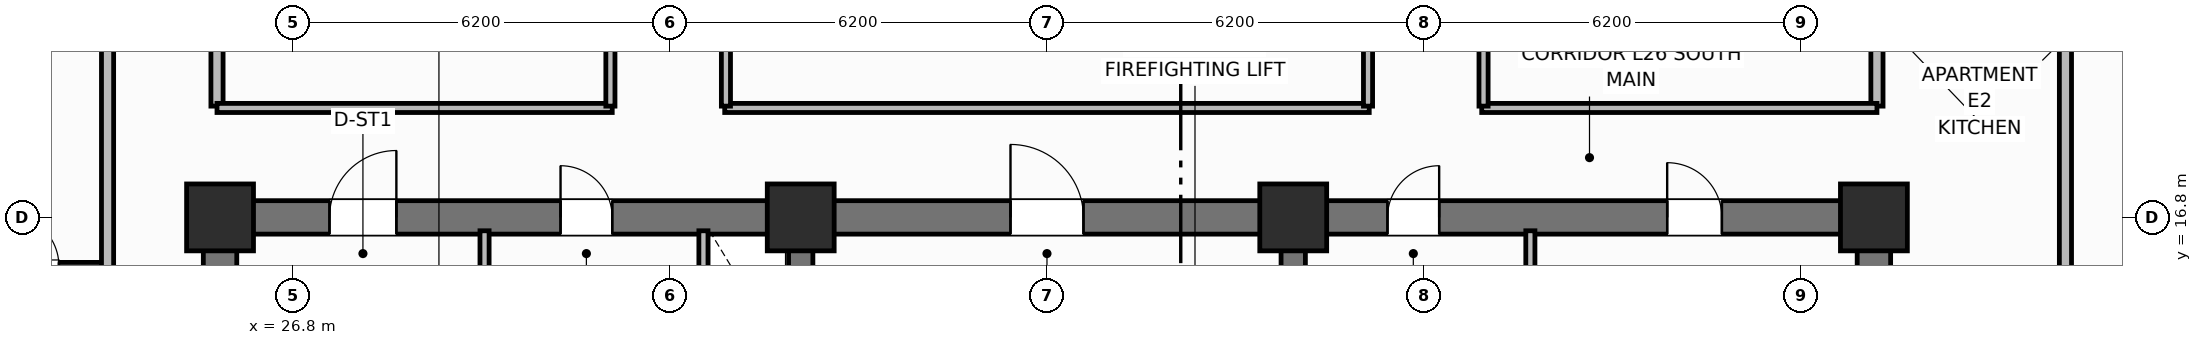
"""IFC4 building model, lengths in metres.
Left out: names, types, materials, properties, quantities, classifications, styles, units other than length and angle.
Written with IfcOpenShell. Run it as: python <this file> out.ifc"""

import sys

from ifc_helpers import new_model, si_unit, direction, frame, frame_2d, origin, origin_2d, place, context, subcontext, project, spatial, rectangle, extrude, element, fill, save


model = new_model("IFC4")
c1 = context("Model", 3, precision=1e-05, world=origin(), true_north=direction((0.0, 1.0)))
c2 = subcontext(c1, "Body", "Model", "MODEL_VIEW")
j1 = project(units=[si_unit("LENGTHUNIT", "METRE"), si_unit("PLANEANGLEUNIT", "RADIAN")], contexts=[c1])
p1 = place(None, origin())
s1 = spatial("IfcSite", under=j1, at=p1, CompositionType="ELEMENT")
p2 = place(p1, origin())
s2 = spatial("IfcBuilding", under=s1, at=p2, CompositionType="ELEMENT")
p3 = place(p2, frame((0.0, 0.0, 106.8)))
s3 = spatial("IfcBuildingStorey", under=s2, at=p3, CompositionType="ELEMENT", Elevation=106.8)
for number, where, z_axis, x_axis in (
    (1, (25.6, 10.875, 0.0), (0.0, 0.0, 1.0), (0.0, 1.0, 0.0)),
    (2, (52.8, 10.875, 0.0), (0.0, 0.0, 1.0), (0.0, 1.0, 0.0)),
):
    element("IfcWall", number, at=place(p3, frame(where, z_axis=z_axis, x_axis=x_axis)), inside=s3, PredefinedType="SHEAR", context=c2, shape_type="SweptSolid", body=[
        extrude(rectangle(XDim=5.65, YDim=0.55, at=frame_2d((2.825, 0.0))), origin(), (0.0, 0.0, 1.0), 3.7),
    ])
p4 = place(p3, frame((25.6, 16.8, 0.0), z_axis=(0.0, 0.0, 1.0), x_axis=(1.0, 0.0, 0.0)))
e3 = element("IfcWall", 3, at=p4, inside=s3, PredefinedType="SHEAR", context=c2, shape_type="SweptSolid", body=[
    extrude(rectangle(XDim=27.2, YDim=0.55, at=frame_2d((13.6, 0.0))), origin(), (0.0, 0.0, 1.0), 3.7),
])
p5 = place(p4, frame((1.8, 0.0, 0.0)))
e4 = element("IfcOpeningElement", 4, at=p5, cuts=e3, PredefinedType="OPENING", context=c2, shape_type="SweptSolid", body=[
    extrude(rectangle(XDim=1.1, YDim=2.15, at=frame_2d((0.55, 1.075))), frame((0.0, 0.285, 0.0), z_axis=(0.0, -1.0, 0.0), x_axis=(1.0, 0.0, 0.0)), (0.0, 0.0, 1.0), 0.57),
])
p6 = place(p4, frame((5.6, 0.0, 0.0)))
e5 = element("IfcOpeningElement", 5, at=p6, cuts=e3, PredefinedType="OPENING", context=c2, shape_type="SweptSolid", body=[
    extrude(rectangle(XDim=0.85, YDim=2.1, at=frame_2d((0.425, 1.05))), frame((0.0, 0.285, 0.0), z_axis=(0.0, -1.0, 0.0), x_axis=(1.0, 0.0, 0.0)), (0.0, 0.0, 1.0), 0.57),
])
p7 = place(p4, frame((13.0, 0.0, 0.0)))
e6 = element("IfcOpeningElement", 6, at=p7, cuts=e3, PredefinedType="OPENING", context=c2, shape_type="SweptSolid", body=[
    extrude(rectangle(XDim=1.2, YDim=2.15, at=frame_2d((0.6, 1.075))), frame((0.0, 0.285, 0.0), z_axis=(0.0, -1.0, 0.0), x_axis=(1.0, 0.0, 0.0)), (0.0, 0.0, 1.0), 0.57),
])
p8 = place(p4, frame((19.2, 0.0, 0.0)))
e7 = element("IfcOpeningElement", 7, at=p8, cuts=e3, PredefinedType="OPENING", context=c2, shape_type="SweptSolid", body=[
    extrude(rectangle(XDim=0.85, YDim=2.1, at=frame_2d((0.425, 1.05))), frame((0.0, 0.285, 0.0), z_axis=(0.0, -1.0, 0.0), x_axis=(1.0, 0.0, 0.0)), (0.0, 0.0, 1.0), 0.57),
])
p9 = place(p4, frame((23.8, 0.0, 0.0)))
e8 = element("IfcOpeningElement", 8, at=p9, cuts=e3, PredefinedType="OPENING", context=c2, shape_type="SweptSolid", body=[
    extrude(rectangle(XDim=0.9, YDim=2.1, at=frame_2d((0.45, 1.05))), frame((0.0, 0.285, 0.0), z_axis=(0.0, -1.0, 0.0), x_axis=(1.0, 0.0, 0.0)), (0.0, 0.0, 1.0), 0.57),
])
for number, where, z_axis, x_axis in (
    (9, (35.15, 10.875, 0.0), (0.0, 0.0, 1.0), (0.0, 1.0, 0.0)),
    (10, (43.25, 10.875, 0.0), (0.0, 0.0, 1.0), (0.0, 1.0, 0.0)),
):
    element("IfcWall", number, at=place(p3, frame(where, z_axis=z_axis, x_axis=x_axis)), inside=s3, PredefinedType="SHEAR", context=c2, shape_type="SweptSolid", body=[
        extrude(rectangle(XDim=5.65, YDim=0.4, at=frame_2d((2.825, 0.0))), origin(), (0.0, 0.0, 1.0), 3.7),
    ])
for number, where, z_axis, x_axis in (
    (11, (25.6, 16.8, 0.0), (0.0, 0.0, 1.0), (1.0, 0.0, 0.0)),
    (12, (35.15, 16.8, 0.0), (0.0, 0.0, 1.0), (1.0, 0.0, 0.0)),
    (13, (43.25, 16.8, 0.0), (0.0, 0.0, 1.0), (1.0, 0.0, 0.0)),
    (14, (52.8, 16.8, 0.0), (0.0, 0.0, 1.0), (1.0, 0.0, 0.0)),
):
    element("IfcColumn", number, at=place(p3, frame(where, z_axis=z_axis, x_axis=x_axis)), inside=s3, PredefinedType="COLUMN", context=c2, shape_type="SweptSolid", body=[
        extrude(rectangle(XDim=1.1, YDim=1.1, at=origin_2d()), origin(), (0.0, 0.0, 1.0), 3.7),
    ])
p10 = place(p3, frame((29.95, 14.5, 0.0), z_axis=(0.0, 0.0, 1.0), x_axis=(0.0, 1.0, 0.0)))
e15 = element("IfcWall", 15, at=p10, inside=s3, PredefinedType="PARTITIONING", context=c2, shape_type="SweptSolid", body=[
    extrude(rectangle(XDim=2.08, YDim=0.15, at=frame_2d((1.04, 0.0))), origin(), (0.0, 0.0, 1.0), 2.53),
])
p11 = place(p3, frame((33.55, 14.5, 0.0), z_axis=(0.0, 0.0, 1.0), x_axis=(0.0, 1.0, 0.0)))
e16 = element("IfcWall", 16, at=p11, inside=s3, PredefinedType="PARTITIONING", context=c2, shape_type="SweptSolid", body=[
    extrude(rectangle(XDim=2.08, YDim=0.15, at=frame_2d((1.04, 0.0))), origin(), (0.0, 0.0, 1.0), 2.53),
])
p12 = place(p11, frame((0.55, 0.0, 0.0)))
e17 = element("IfcOpeningElement", 17, at=p12, cuts=e16, PredefinedType="OPENING", context=c2, shape_type="SweptSolid", body=[
    extrude(rectangle(XDim=0.85, YDim=2.05, at=frame_2d((0.425, 1.025))), frame((0.0, 0.085, 0.0), z_axis=(0.0, -1.0, 0.0), x_axis=(1.0, 0.0, 0.0)), (0.0, 0.0, 1.0), 0.17),
])
p13 = place(p3, frame((47.15, 10.95, 0.0), z_axis=(0.0, 0.0, 1.0), x_axis=(0.0, 1.0, 0.0)))
e18 = element("IfcWall", 18, at=p13, inside=s3, PredefinedType="PARTITIONING", context=c2, shape_type="SweptSolid", body=[
    extrude(rectangle(XDim=5.63, YDim=0.15, at=frame_2d((2.815, 0.0))), origin(), (0.0, 0.0, 1.0), 2.53),
])
for number, where, z_axis, x_axis in (
    (19, (25.55, 18.63, 0.0), (0.0, 0.0, 1.0), (0.0, 1.0, 0.0)),
    (20, (52.85, 18.63, 0.0), (0.0, 0.0, 1.0), (0.0, 1.0, 0.0)),
):
    element("IfcWall", number, at=place(p3, frame(where, z_axis=z_axis, x_axis=x_axis)), inside=s3, PredefinedType="PARTITIONING", context=c2, shape_type="SweptSolid", body=[
        extrude(rectangle(XDim=19.14, YDim=0.2, at=frame_2d((9.57, 0.0))), origin(), (0.0, 0.0, 1.0), 2.53),
    ])
p14 = place(p3, frame((25.55, 18.6, 0.0), z_axis=(0.0, 0.0, 1.0), x_axis=(1.0, 0.0, 0.0)))
e21 = element("IfcWall", 21, at=p14, inside=s3, PredefinedType="PARTITIONING", context=c2, shape_type="SweptSolid", body=[
    extrude(rectangle(XDim=6.5, YDim=0.15, at=frame_2d((3.25, 0.0))), origin(), (0.0, 0.0, 1.0), 2.53),
])
p15 = place(p3, frame((33.9, 18.6, 0.0), z_axis=(0.0, 0.0, 1.0), x_axis=(1.0, 0.0, 0.0)))
e22 = element("IfcWall", 22, at=p15, inside=s3, PredefinedType="PARTITIONING", context=c2, shape_type="SweptSolid", body=[
    extrude(rectangle(XDim=10.6, YDim=0.15, at=frame_2d((5.3, 0.0))), origin(), (0.0, 0.0, 1.0), 2.53),
])
p16 = place(p3, frame((46.35, 18.6, 0.0), z_axis=(0.0, 0.0, 1.0), x_axis=(1.0, 0.0, 0.0)))
e23 = element("IfcWall", 23, at=p16, inside=s3, PredefinedType="PARTITIONING", context=c2, shape_type="SweptSolid", body=[
    extrude(rectangle(XDim=6.5, YDim=0.15, at=frame_2d((3.25, 0.0))), origin(), (0.0, 0.0, 1.0), 2.53),
])
p17 = place(p3, frame((32.02, 18.63, 0.0), z_axis=(0.0, 0.0, 1.0), x_axis=(0.0, 1.0, 0.0)))
e24 = element("IfcWall", 24, at=p17, inside=s3, PredefinedType="PARTITIONING", context=c2, shape_type="SweptSolid", body=[
    extrude(rectangle(XDim=19.14, YDim=0.15, at=frame_2d((9.57, 0.0))), origin(), (0.0, 0.0, 1.0), 2.53),
])
p18 = place(p17, frame((5.5, 0.0, 0.0)))
e25 = element("IfcOpeningElement", 25, at=p18, cuts=e24, PredefinedType="OPENING", context=c2, shape_type="SweptSolid", body=[
    extrude(rectangle(XDim=1.0, YDim=2.15, at=frame_2d((0.5, 1.075))), frame((0.0, 0.085, 0.0), z_axis=(0.0, -1.0, 0.0), x_axis=(1.0, 0.0, 0.0)), (0.0, 0.0, 1.0), 0.17),
])
p19 = place(p3, frame((33.92, 18.63, 0.0), z_axis=(0.0, 0.0, 1.0), x_axis=(0.0, 1.0, 0.0)))
e26 = element("IfcWall", 26, at=p19, inside=s3, PredefinedType="PARTITIONING", context=c2, shape_type="SweptSolid", body=[
    extrude(rectangle(XDim=19.14, YDim=0.15, at=frame_2d((9.57, 0.0))), origin(), (0.0, 0.0, 1.0), 2.53),
])
p20 = place(p19, frame((2.4, 0.0, 0.0)))
e27 = element("IfcOpeningElement", 27, at=p20, cuts=e26, PredefinedType="OPENING", context=c2, shape_type="SweptSolid", body=[
    extrude(rectangle(XDim=1.0, YDim=2.15, at=frame_2d((0.5, 1.075))), frame((0.0, 0.085, 0.0), z_axis=(0.0, -1.0, 0.0), x_axis=(1.0, 0.0, 0.0)), (0.0, 0.0, 1.0), 0.17),
])
p21 = place(p3, frame((44.48, 18.63, 0.0), z_axis=(0.0, 0.0, 1.0), x_axis=(0.0, 1.0, 0.0)))
e28 = element("IfcWall", 28, at=p21, inside=s3, PredefinedType="PARTITIONING", context=c2, shape_type="SweptSolid", body=[
    extrude(rectangle(XDim=19.14, YDim=0.15, at=frame_2d((9.57, 0.0))), origin(), (0.0, 0.0, 1.0), 2.53),
])
p22 = place(p21, frame((10.804, 0.0, 0.0)))
e29 = element("IfcOpeningElement", 29, at=p22, cuts=e28, PredefinedType="OPENING", context=c2, shape_type="SweptSolid", body=[
    extrude(rectangle(XDim=1.0, YDim=2.15, at=frame_2d((0.5, 1.075))), frame((0.0, 0.085, 0.0), z_axis=(0.0, -1.0, 0.0), x_axis=(1.0, 0.0, 0.0)), (0.0, 0.0, 1.0), 0.17),
])
p23 = place(p3, frame((46.38, 18.63, 0.0), z_axis=(0.0, 0.0, 1.0), x_axis=(0.0, 1.0, 0.0)))
e30 = element("IfcWall", 30, at=p23, inside=s3, PredefinedType="PARTITIONING", context=c2, shape_type="SweptSolid", body=[
    extrude(rectangle(XDim=19.14, YDim=0.15, at=frame_2d((9.57, 0.0))), origin(), (0.0, 0.0, 1.0), 2.53),
])
p24 = place(p23, frame((5.5, 0.0, 0.0)))
e31 = element("IfcOpeningElement", 31, at=p24, cuts=e30, PredefinedType="OPENING", context=c2, shape_type="SweptSolid", body=[
    extrude(rectangle(XDim=1.0, YDim=2.15, at=frame_2d((0.5, 1.075))), frame((0.0, 0.085, 0.0), z_axis=(0.0, -1.0, 0.0), x_axis=(1.0, 0.0, 0.0)), (0.0, 0.0, 1.0), 0.17),
])
p25 = place(p3, frame((21.5, 16.0, 0.0), z_axis=(0.0, 0.0, 1.0), x_axis=(1.0, 0.0, 0.0)))
e32 = element("IfcWall", 32, at=p25, inside=s3, PredefinedType="PARTITIONING", context=c2, shape_type="SweptSolid", body=[
    extrude(rectangle(XDim=2.25, YDim=0.12, at=frame_2d((1.125, 0.0))), origin(), (0.0, 0.0, 1.0), 2.53),
])
p26 = place(p25, frame((0.6, 0.0, 0.0)))
e33 = element("IfcOpeningElement", 33, at=p26, cuts=e32, PredefinedType="OPENING", context=c2, shape_type="SweptSolid", body=[
    extrude(rectangle(XDim=0.85, YDim=2.1, at=frame_2d((0.425, 1.05))), frame((0.0, 0.07, 0.0), z_axis=(0.0, -1.0, 0.0), x_axis=(1.0, 0.0, 0.0)), (0.0, 0.0, 1.0), 0.14),
])
p27 = place(p3, frame((23.75, 10.6, 0.0), z_axis=(0.0, 0.0, 1.0), x_axis=(0.0, 1.0, 0.0)))
e34 = element("IfcWall", 34, at=p27, inside=s3, PredefinedType="PARTITIONING", context=c2, shape_type="SweptSolid", body=[
    extrude(rectangle(XDim=35.2, YDim=0.2, at=frame_2d((17.6, 0.0))), origin(), (0.0, 0.0, 1.0), 2.53),
])
p28 = place(p27, frame((2.65, 0.0, 0.0)))
e35 = element("IfcOpeningElement", 35, at=p28, cuts=e34, PredefinedType="OPENING", context=c2, shape_type="SweptSolid", body=[
    extrude(rectangle(XDim=1.0, YDim=2.15, at=frame_2d((0.5, 1.075))), frame((0.0, 0.11, 0.0), z_axis=(0.0, -1.0, 0.0), x_axis=(1.0, 0.0, 0.0)), (0.0, 0.0, 1.0), 0.22),
])
p29 = place(p27, frame((12.87, 0.0, 0.0)))
e36 = element("IfcOpeningElement", 36, at=p29, cuts=e34, PredefinedType="OPENING", context=c2, shape_type="SweptSolid", body=[
    extrude(rectangle(XDim=1.0, YDim=2.15, at=frame_2d((0.5, 1.075))), frame((0.0, 0.11, 0.0), z_axis=(0.0, -1.0, 0.0), x_axis=(1.0, 0.0, 0.0)), (0.0, 0.0, 1.0), 0.22),
])
p30 = place(p27, frame((24.486, 0.0, 0.0)))
e37 = element("IfcOpeningElement", 37, at=p30, cuts=e34, PredefinedType="OPENING", context=c2, shape_type="SweptSolid", body=[
    extrude(rectangle(XDim=1.0, YDim=2.15, at=frame_2d((0.5, 1.075))), frame((0.0, 0.11, 0.0), z_axis=(0.0, -1.0, 0.0), x_axis=(1.0, 0.0, 0.0)), (0.0, 0.0, 1.0), 0.22),
])
p31 = place(p3, frame((55.95, 10.6, 0.0), z_axis=(0.0, 0.0, 1.0), x_axis=(0.0, 1.0, 0.0)))
e38 = element("IfcWall", 38, at=p31, inside=s3, PredefinedType="PARTITIONING", context=c2, shape_type="SweptSolid", body=[
    extrude(rectangle(XDim=35.2, YDim=0.2, at=frame_2d((17.6, 0.0))), origin(), (0.0, 0.0, 1.0), 2.53),
])
p32 = place(p31, frame((2.65, 0.0, 0.0)))
e39 = element("IfcOpeningElement", 39, at=p32, cuts=e38, PredefinedType="OPENING", context=c2, shape_type="SweptSolid", body=[
    extrude(rectangle(XDim=1.0, YDim=2.15, at=frame_2d((0.5, 1.075))), frame((0.0, 0.11, 0.0), z_axis=(0.0, -1.0, 0.0), x_axis=(1.0, 0.0, 0.0)), (0.0, 0.0, 1.0), 0.22),
])
p33 = place(p31, frame((11.352, 0.0, 0.0)))
e40 = element("IfcOpeningElement", 40, at=p33, cuts=e38, PredefinedType="OPENING", context=c2, shape_type="SweptSolid", body=[
    extrude(rectangle(XDim=1.0, YDim=2.15, at=frame_2d((0.5, 1.075))), frame((0.0, 0.11, 0.0), z_axis=(0.0, -1.0, 0.0), x_axis=(1.0, 0.0, 0.0)), (0.0, 0.0, 1.0), 0.22),
])
p34 = place(p31, frame((21.37, 0.0, 0.0)))
e41 = element("IfcOpeningElement", 41, at=p34, cuts=e38, PredefinedType="OPENING", context=c2, shape_type="SweptSolid", body=[
    extrude(rectangle(XDim=1.0, YDim=2.15, at=frame_2d((0.5, 1.075))), frame((0.0, 0.11, 0.0), z_axis=(0.0, -1.0, 0.0), x_axis=(1.0, 0.0, 0.0)), (0.0, 0.0, 1.0), 0.22),
])
p35 = place(p31, frame((27.302, 0.0, 0.0)))
e42 = element("IfcOpeningElement", 42, at=p35, cuts=e38, PredefinedType="OPENING", context=c2, shape_type="SweptSolid", body=[
    extrude(rectangle(XDim=1.0, YDim=2.15, at=frame_2d((0.5, 1.075))), frame((0.0, 0.11, 0.0), z_axis=(0.0, -1.0, 0.0), x_axis=(1.0, 0.0, 0.0)), (0.0, 0.0, 1.0), 0.22),
])
p36 = place(p26, origin())
e43 = element("IfcDoor", 43, at=p36, inside=s3, OperationType="SINGLE_SWING_LEFT", PredefinedType="DOOR", context=c2, shape_type="SweptSolid", body=[
    extrude(rectangle(XDim=0.85, YDim=2.1, at=frame_2d((0.425, 1.05))), frame((0.0, 0.025, 0.0), z_axis=(0.0, -1.0, 0.0), x_axis=(1.0, 0.0, 0.0)), (0.0, 0.0, 1.0), 0.05),
])
fill(e33, e43)
p37 = place(p5, origin())
e44 = element("IfcDoor", 44, at=p37, inside=s3, OperationType="SINGLE_SWING_RIGHT", PredefinedType="DOOR", context=c2, shape_type="SweptSolid", body=[
    extrude(rectangle(XDim=1.1, YDim=2.15, at=frame_2d((0.55, 1.075))), frame((0.0, 0.025, 0.0), z_axis=(0.0, -1.0, 0.0), x_axis=(1.0, 0.0, 0.0)), (0.0, 0.0, 1.0), 0.05),
])
fill(e4, e44)
p38 = place(p6, origin())
e45 = element("IfcDoor", 45, at=p38, inside=s3, OperationType="SINGLE_SWING_LEFT", PredefinedType="DOOR", context=c2, shape_type="SweptSolid", body=[
    extrude(rectangle(XDim=0.85, YDim=2.1, at=frame_2d((0.425, 1.05))), frame((0.0, 0.025, 0.0), z_axis=(0.0, -1.0, 0.0), x_axis=(1.0, 0.0, 0.0)), (0.0, 0.0, 1.0), 0.05),
])
fill(e5, e45)
p39 = place(p7, origin())
e46 = element("IfcDoor", 46, at=p39, inside=s3, OperationType="SINGLE_SWING_LEFT", PredefinedType="DOOR", context=c2, shape_type="SweptSolid", body=[
    extrude(rectangle(XDim=1.2, YDim=2.15, at=frame_2d((0.6, 1.075))), frame((0.0, 0.025, 0.0), z_axis=(0.0, -1.0, 0.0), x_axis=(1.0, 0.0, 0.0)), (0.0, 0.0, 1.0), 0.05),
])
fill(e6, e46)
p40 = place(p8, origin())
e47 = element("IfcDoor", 47, at=p40, inside=s3, OperationType="SINGLE_SWING_RIGHT", PredefinedType="DOOR", context=c2, shape_type="SweptSolid", body=[
    extrude(rectangle(XDim=0.85, YDim=2.1, at=frame_2d((0.425, 1.05))), frame((0.0, 0.025, 0.0), z_axis=(0.0, -1.0, 0.0), x_axis=(1.0, 0.0, 0.0)), (0.0, 0.0, 1.0), 0.05),
])
fill(e7, e47)
p41 = place(p9, origin())
e48 = element("IfcDoor", 48, at=p41, inside=s3, OperationType="SINGLE_SWING_LEFT", PredefinedType="DOOR", context=c2, shape_type="SweptSolid", body=[
    extrude(rectangle(XDim=0.9, YDim=2.1, at=frame_2d((0.45, 1.05))), frame((0.0, 0.025, 0.0), z_axis=(0.0, -1.0, 0.0), x_axis=(1.0, 0.0, 0.0)), (0.0, 0.0, 1.0), 0.05),
])
fill(e8, e48)
save(model, sys.argv[1])
